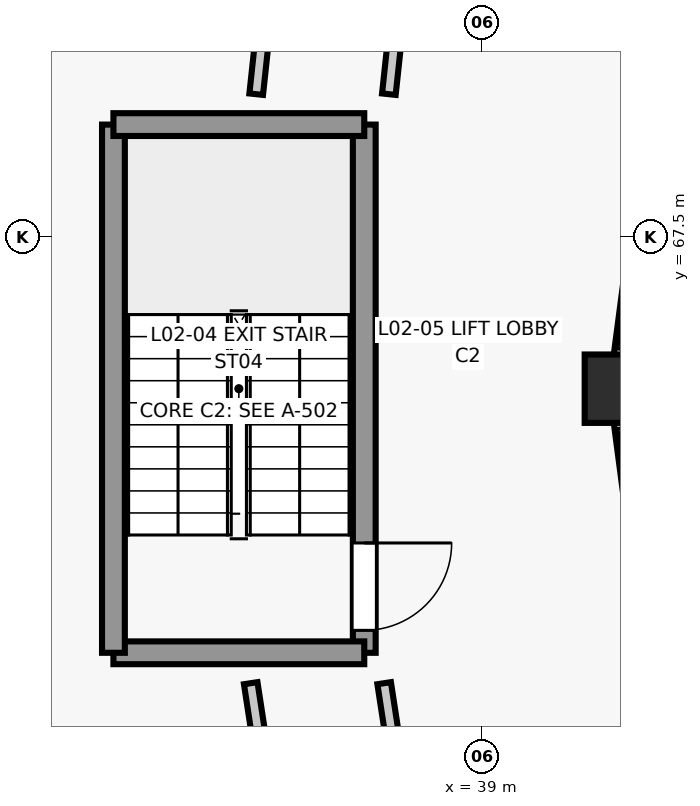
"""IFC4 building model, lengths in metres.
Left out: names, types, materials, properties, quantities, classifications, styles, units other than length and angle.
Written with IfcOpenShell. Run it as: python <this file> out.ifc"""

import sys

from ifc_helpers import new_model, si_unit, direction, frame, frame_2d, origin, origin_2d, place, context, subcontext, project, spatial, rectangle, circle, extrude, element, fill, save


model = new_model("IFC4")
c1 = context("Model", 3, precision=1e-05, world=origin(), true_north=direction((0.0, 1.0)))
c2 = subcontext(c1, "Body", "Model", "MODEL_VIEW")
j1 = project(units=[si_unit("LENGTHUNIT", "METRE"), si_unit("PLANEANGLEUNIT", "RADIAN")], contexts=[c1])
p1 = place(None, origin())
s1 = spatial("IfcSite", under=j1, at=p1, CompositionType="ELEMENT")
p2 = place(p1, origin())
s2 = spatial("IfcBuilding", under=s1, at=p2, CompositionType="ELEMENT")
p3 = place(p2, frame((0.0, 0.0, 8.7)))
s3 = spatial("IfcBuildingStorey", under=s2, at=p3, CompositionType="ELEMENT", Elevation=8.7)
p4 = place(p3, frame((40.8, 65.5, 0.0), z_axis=(0.0, 0.0, 1.0), x_axis=(1.0, 0.0, 0.0)))
e1 = element("IfcColumn", 1, at=p4, inside=s3, PredefinedType="COLUMN", context=c2, shape_type="SweptSolid", body=[
    extrude(circle(Radius=0.45, at=origin_2d()), origin(), (0.0, 0.0, 1.0), 3.9),
])
p5 = place(p3, frame((31.963, 65.975, 0.0), z_axis=(0.0, 0.0, 1.0), x_axis=(0.130513242145, 0.991446566197, 0.0)))
e2 = element("IfcWall", 2, at=p5, inside=s3, PredefinedType="STANDARD", context=c2, shape_type="SweptSolid", body=[
    extrude(rectangle(XDim=11.076, YDim=0.28, at=frame_2d((5.538, 0.0))), origin(), (0.0, 0.0, 1.0), 0.82),
])
p6 = place(p3, frame((42.031, 74.853, 0.0), z_axis=(0.0, 0.0, 1.0), x_axis=(-0.130549698469, -0.991441766434, 0.0)))
e3 = element("IfcWall", 3, at=p6, inside=s3, PredefinedType="STANDARD", context=c2, shape_type="SweptSolid", body=[
    extrude(rectangle(XDim=9.156, YDim=0.25, at=frame_2d((4.578, 0.0))), origin(), (0.0, 0.0, 1.0), 0.82),
])
p7 = place(p3, frame((33.408, 54.044, 0.0), z_axis=(0.0, 0.0, 1.0), x_axis=(-0.130513242145, 0.991446566197, 0.0)))
e4 = element("IfcWall", 4, at=p7, inside=s3, PredefinedType="STANDARD", context=c2, shape_type="SweptSolid", body=[
    extrude(rectangle(XDim=11.076, YDim=0.28, at=frame_2d((5.538, 0.0))), origin(), (0.0, 0.0, 1.0), 2.706),
])
p8 = place(p7, frame((4.538, 0.0, 0.85)))
e5 = element("IfcOpeningElement", 5, at=p8, cuts=e4, PredefinedType="OPENING", context=c2, shape_type="SweptSolid", body=[
    extrude(rectangle(XDim=2.0, YDim=1.4, at=frame_2d((1.0, 0.7))), frame((0.0, 0.15, 0.0), z_axis=(0.0, -1.0, 0.0), x_axis=(1.0, 0.0, 0.0)), (0.0, 0.0, 1.0), 0.3),
])
p9 = place(p3, frame((40.836, 65.225, 0.0), z_axis=(0.0, 0.0, 1.0), x_axis=(0.130549698469, -0.991441766434, 0.0)))
e6 = element("IfcWall", 6, at=p9, inside=s3, PredefinedType="STANDARD", context=c2, shape_type="SweptSolid", body=[
    extrude(rectangle(XDim=9.156, YDim=0.25, at=frame_2d((4.578, 0.0))), origin(), (0.0, 0.0, 1.0), 0.82),
])
p10 = place(p3, frame((37.45, 68.975, 0.0), z_axis=(0.0, 0.0, 1.0), x_axis=(0.0, -1.0, 0.0)))
e7 = element("IfcWall", 7, at=p10, inside=s3, PredefinedType="SHEAR", context=c2, shape_type="SweptSolid", body=[
    extrude(rectangle(XDim=6.95, YDim=0.3, at=frame_2d((3.475, 0.0))), origin(), (0.0, 0.0, 1.0), 3.9),
])
p11 = place(p10, frame((5.505, 0.0, 0.0)))
e8 = element("IfcOpeningElement", 8, at=p11, cuts=e7, PredefinedType="OPENING", context=c2, shape_type="SweptSolid", body=[
    extrude(rectangle(XDim=1.15, YDim=2.15, at=frame_2d((0.575, 1.075))), frame((0.0, 0.16, 0.0), z_axis=(0.0, -1.0, 0.0), x_axis=(1.0, 0.0, 0.0)), (0.0, 0.0, 1.0), 0.32),
])
p12 = place(p3, frame((37.45, 62.025, 0.0), z_axis=(0.0, 0.0, 1.0), x_axis=(-1.0, 0.0, 0.0)))
e9 = element("IfcWall", 9, at=p12, inside=s3, PredefinedType="SHEAR", context=c2, shape_type="SweptSolid", body=[
    extrude(rectangle(XDim=3.3, YDim=0.3, at=frame_2d((1.65, 0.0))), origin(), (0.0, 0.0, 1.0), 3.9),
])
p13 = place(p3, frame((34.15, 62.025, 0.0), z_axis=(0.0, 0.0, 1.0), x_axis=(0.0, 1.0, 0.0)))
e10 = element("IfcWall", 10, at=p13, inside=s3, PredefinedType="SHEAR", context=c2, shape_type="SweptSolid", body=[
    extrude(rectangle(XDim=6.95, YDim=0.3, at=frame_2d((3.475, 0.0))), origin(), (0.0, 0.0, 1.0), 3.9),
])
p14 = place(p3, frame((34.15, 68.975, 0.0), z_axis=(0.0, 0.0, 1.0), x_axis=(1.0, 0.0, 0.0)))
e11 = element("IfcWall", 11, at=p14, inside=s3, PredefinedType="SHEAR", context=c2, shape_type="SweptSolid", body=[
    extrude(rectangle(XDim=3.3, YDim=0.3, at=frame_2d((1.65, 0.0))), origin(), (0.0, 0.0, 1.0), 3.9),
])
p15 = place(p3, frame((36.674, 75.421, 0.0), z_axis=(0.0, 0.0, 1.0), x_axis=(-0.106195719011, -0.994345246513, 0.0)))
e12 = element("IfcWall", 12, at=p15, inside=s3, PredefinedType="PARTITIONING", context=c2, shape_type="SweptSolid", body=[
    extrude(rectangle(XDim=6.081, YDim=0.18, at=frame_2d((3.041, 0.0))), origin(), (0.0, 0.0, 1.0), 3.495),
])
p16 = place(p15, frame((2.29, 0.0, 0.0)))
e13 = element("IfcOpeningElement", 13, at=p16, cuts=e12, PredefinedType="OPENING", context=c2, shape_type="SweptSolid", body=[
    extrude(rectangle(XDim=1.5, YDim=2.15, at=frame_2d((0.75, 1.075))), frame((0.0, 0.1, 0.0), z_axis=(0.0, -1.0, 0.0), x_axis=(1.0, 0.0, 0.0)), (0.0, 0.0, 1.0), 0.2),
])
p17 = place(p3, frame((38.376, 75.013, 0.0), z_axis=(0.0, 0.0, 1.0), x_axis=(-0.106224489748, -0.994342173388, 0.0)))
e14 = element("IfcWall", 14, at=p17, inside=s3, PredefinedType="PARTITIONING", context=c2, shape_type="SweptSolid", body=[
    extrude(rectangle(XDim=5.67, YDim=0.18, at=frame_2d((2.835, 0.0))), origin(), (0.0, 0.0, 1.0), 3.495),
])
p18 = place(p17, frame((2.11, 0.0, 0.0)))
e15 = element("IfcOpeningElement", 15, at=p18, cuts=e14, PredefinedType="OPENING", context=c2, shape_type="SweptSolid", body=[
    extrude(rectangle(XDim=1.45, YDim=2.2, at=frame_2d((0.725, 1.1))), frame((0.0, 0.1, 0.0), z_axis=(0.0, -1.0, 0.0), x_axis=(1.0, 0.0, 0.0)), (0.0, 0.0, 1.0), 0.2),
])
p19 = place(p3, frame((35.956, 61.625, 0.0), z_axis=(0.0, 0.0, 1.0), x_axis=(0.151461983826, -0.988463083507, 0.0)))
e16 = element("IfcWall", 16, at=p19, inside=s3, PredefinedType="PARTITIONING", context=c2, shape_type="SweptSolid", body=[
    extrude(rectangle(XDim=8.014, YDim=0.18, at=frame_2d((4.007, 0.0))), origin(), (0.0, 0.0, 1.0), 3.495),
])
p20 = place(p19, frame((3.532, 0.0, 0.0)))
e17 = element("IfcOpeningElement", 17, at=p20, cuts=e16, PredefinedType="OPENING", context=c2, shape_type="SweptSolid", body=[
    extrude(rectangle(XDim=0.95, YDim=2.1, at=frame_2d((0.475, 1.05))), frame((0.0, 0.1, 0.0), z_axis=(0.0, -1.0, 0.0), x_axis=(1.0, 0.0, 0.0)), (0.0, 0.0, 1.0), 0.2),
])
p21 = place(p3, frame((37.712, 61.625, 0.0), z_axis=(0.0, 0.0, 1.0), x_axis=(0.151459677587, -0.988463436888, 0.0)))
e18 = element("IfcWall", 18, at=p21, inside=s3, PredefinedType="PARTITIONING", context=c2, shape_type="SweptSolid", body=[
    extrude(rectangle(XDim=7.523, YDim=0.18, at=frame_2d((3.761, 0.0))), origin(), (0.0, 0.0, 1.0), 3.495),
])
p22 = place(p21, frame((3.236, 0.0, 0.0)))
e19 = element("IfcOpeningElement", 19, at=p22, cuts=e18, PredefinedType="OPENING", context=c2, shape_type="SweptSolid", body=[
    extrude(rectangle(XDim=1.05, YDim=2.1, at=frame_2d((0.525, 1.05))), frame((0.0, 0.1, 0.0), z_axis=(0.0, -1.0, 0.0), x_axis=(1.0, 0.0, 0.0)), (0.0, 0.0, 1.0), 0.2),
])
p23 = place(p11, origin())
e20 = element("IfcDoor", 20, at=p23, inside=s3, OperationType="SINGLE_SWING_LEFT", PredefinedType="DOOR", context=c2, shape_type="SweptSolid", body=[
    extrude(rectangle(XDim=1.15, YDim=2.15, at=frame_2d((0.575, 1.075))), frame((0.0, 0.025, 0.0), z_axis=(0.0, -1.0, 0.0), x_axis=(1.0, 0.0, 0.0)), (0.0, 0.0, 1.0), 0.05),
])
fill(e8, e20)
save(model, sys.argv[1])
